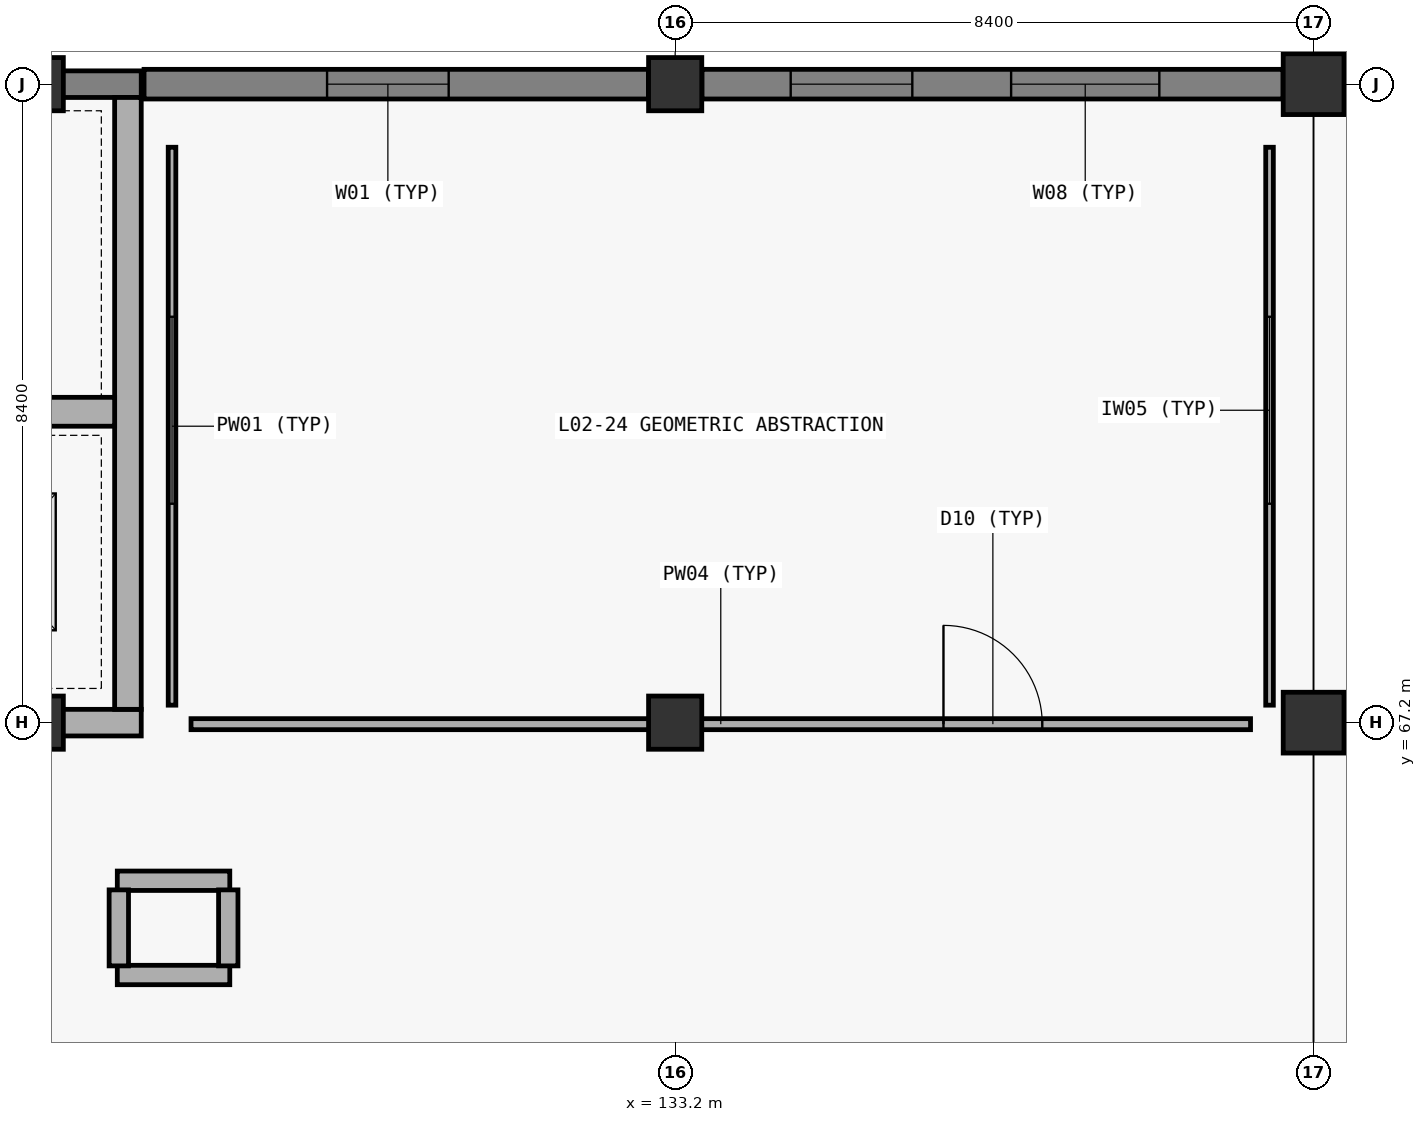
"""IFC4 building model, lengths in metres.
Left out: names, types, materials, properties, quantities, classifications, styles, units other than length and angle.
Written with IfcOpenShell. Run it as: python <this file> out.ifc"""

import sys

from ifc_helpers import new_model, si_unit, direction, frame, frame_2d, origin, origin_2d, place, context, subcontext, project, spatial, rectangle, extrude, element, fill, save


model = new_model("IFC4")
c1 = context("Model", 3, precision=1e-05, world=origin(), true_north=direction((0.0, 1.0)))
c2 = subcontext(c1, "Body", "Model", "MODEL_VIEW")
j1 = project(units=[si_unit("LENGTHUNIT", "METRE"), si_unit("PLANEANGLEUNIT", "RADIAN")], contexts=[c1])
p1 = place(None, origin())
s1 = spatial("IfcSite", under=j1, at=p1, CompositionType="ELEMENT")
p2 = place(p1, origin())
s2 = spatial("IfcBuilding", under=s1, at=p2, CompositionType="ELEMENT")
p3 = place(p2, frame((0.0, 0.0, 10.5)))
s3 = spatial("IfcBuildingStorey", under=s2, at=p3, CompositionType="ELEMENT", Elevation=10.5)
for number, where, z_axis, x_axis in (
    (1, (124.8, 67.2, 0.0), (0.0, 0.0, 1.0), (1.0, 0.0, 0.0)),
    (2, (124.8, 75.6, 0.0), (0.0, 0.0, 1.0), (1.0, 0.0, 0.0)),
    (3, (133.2, 67.2, 0.0), (0.0, 0.0, 1.0), (1.0, 0.0, 0.0)),
    (4, (133.2, 75.6, 0.0), (0.0, 0.0, 1.0), (1.0, 0.0, 0.0)),
):
    element("IfcColumn", number, at=place(p3, frame(where, z_axis=z_axis, x_axis=x_axis)), inside=s3, PredefinedType="COLUMN", context=c2, shape_type="SweptSolid", body=[
        extrude(rectangle(XDim=0.7, YDim=0.7, at=origin_2d()), origin(), (0.0, 0.0, 1.0), 5.1),
    ])
for number, where, z_axis, x_axis in (
    (5, (141.6, 67.2, 0.0), (0.0, 0.0, 1.0), (1.0, 0.0, 0.0)),
    (6, (141.6, 75.6, 0.0), (0.0, 0.0, 1.0), (1.0, 0.0, 0.0)),
):
    element("IfcColumn", number, at=place(p3, frame(where, z_axis=z_axis, x_axis=x_axis)), inside=s3, PredefinedType="COLUMN", context=c2, shape_type="SweptSolid", body=[
        extrude(rectangle(XDim=0.8, YDim=0.8, at=origin_2d()), origin(), (0.0, 0.0, 1.0), 5.1),
    ])
p4 = place(p3, frame((116.825, 67.2, 0.0), z_axis=(0.0, 0.0, 1.0), x_axis=(1.0, 0.0, 0.0)))
e7 = element("IfcWall", 7, at=p4, inside=s3, PredefinedType="SHEAR", context=c2, shape_type="SweptSolid", body=[
    extrude(rectangle(XDim=9.35, YDim=0.35, at=frame_2d((4.675, 0.0))), origin(), (0.0, 0.0, 1.0), 5.1),
])
p5 = place(p4, frame((1.75, 0.0, 0.0)))
e8 = element("IfcOpeningElement", 8, at=p5, cuts=e7, PredefinedType="OPENING", context=c2, shape_type="SweptSolid", body=[
    extrude(rectangle(XDim=1.18, YDim=2.24, at=frame_2d((0.59, 1.12))), frame((0.0, 0.185, 0.0), z_axis=(0.0, -1.0, 0.0), x_axis=(1.0, 0.0, 0.0)), (0.0, 0.0, 1.0), 0.37),
])
p6 = place(p3, frame((116.825, 75.6, 0.0), z_axis=(0.0, 0.0, 1.0), x_axis=(1.0, 0.0, 0.0)))
e9 = element("IfcWall", 9, at=p6, inside=s3, PredefinedType="SHEAR", context=c2, shape_type="SweptSolid", body=[
    extrude(rectangle(XDim=9.35, YDim=0.35, at=frame_2d((4.675, 0.0))), origin(), (0.0, 0.0, 1.0), 5.1),
])
p7 = place(p3, frame((126.0, 67.375, 0.0), z_axis=(0.0, 0.0, 1.0), x_axis=(0.0, 1.0, 0.0)))
e10 = element("IfcWall", 10, at=p7, inside=s3, PredefinedType="SHEAR", context=c2, shape_type="SweptSolid", body=[
    extrude(rectangle(XDim=8.05, YDim=0.35, at=frame_2d((4.025, 0.0))), origin(), (0.0, 0.0, 1.0), 5.1),
])
p8 = place(p3, frame((117.175, 71.29, 0.0), z_axis=(0.0, 0.0, 1.0), x_axis=(1.0, 0.0, 0.0)))
e11 = element("IfcWall", 11, at=p8, inside=s3, PredefinedType="SHEAR", context=c2, shape_type="SweptSolid", body=[
    extrude(rectangle(XDim=8.65, YDim=0.38, at=frame_2d((4.325, 0.0))), origin(), (0.0, 0.0, 1.0), 5.1),
])
p9 = place(p8, frame((0.45, 0.0, 0.0)))
e12 = element("IfcOpeningElement", 12, at=p9, cuts=e11, PredefinedType="OPENING", context=c2, shape_type="SweptSolid", body=[
    extrude(rectangle(XDim=1.08, YDim=2.18, at=frame_2d((0.54, 1.09))), frame((0.0, 0.2, 0.0), z_axis=(0.0, -1.0, 0.0), x_axis=(1.0, 0.0, 0.0)), (0.0, 0.0, 1.0), 0.4),
])
p10 = place(p3, frame((126.212, 75.6, 0.0), z_axis=(0.0, 0.0, 1.0), x_axis=(1.0, 0.0, 0.0)))
e13 = element("IfcWall", 13, at=p10, inside=s3, PredefinedType="SOLIDWALL", context=c2, shape_type="SweptSolid", body=[
    extrude(rectangle(XDim=6.636, YDim=0.39, at=frame_2d((3.318, 0.0))), origin(), (0.0, 0.0, 1.0), 4.35),
])
p11 = place(p10, frame((2.408, 0.0, 0.85)))
e14 = element("IfcOpeningElement", 14, at=p11, cuts=e13, PredefinedType="OPENING", context=c2, shape_type="SweptSolid", body=[
    extrude(rectangle(XDim=1.6, YDim=2.5, at=frame_2d((0.8, 1.25))), frame((0.0, 0.205, 0.0), z_axis=(0.0, -1.0, 0.0), x_axis=(1.0, 0.0, 0.0)), (0.0, 0.0, 1.0), 0.41),
])
p12 = place(p3, frame((133.552, 75.6, 0.0), z_axis=(0.0, 0.0, 1.0), x_axis=(1.0, 0.0, 0.0)))
e15 = element("IfcWall", 15, at=p12, inside=s3, PredefinedType="SOLIDWALL", context=c2, shape_type="SweptSolid", body=[
    extrude(rectangle(XDim=7.646, YDim=0.39, at=frame_2d((3.823, 0.0))), origin(), (0.0, 0.0, 1.0), 3.9),
])
p13 = place(p12, frame((1.168, 0.0, 0.85)))
e16 = element("IfcOpeningElement", 16, at=p13, cuts=e15, PredefinedType="OPENING", context=c2, shape_type="SweptSolid", body=[
    extrude(rectangle(XDim=1.6, YDim=2.5, at=frame_2d((0.8, 1.25))), frame((0.0, 0.205, 0.0), z_axis=(0.0, -1.0, 0.0), x_axis=(1.0, 0.0, 0.0)), (0.0, 0.0, 1.0), 0.41),
])
p14 = place(p12, frame((4.068, 0.0, 0.85)))
e17 = element("IfcOpeningElement", 17, at=p14, cuts=e15, PredefinedType="OPENING", context=c2, shape_type="SweptSolid", body=[
    extrude(rectangle(XDim=1.95, YDim=2.3, at=frame_2d((0.975, 1.15))), frame((0.0, 0.205, 0.0), z_axis=(0.0, -1.0, 0.0), x_axis=(1.0, 0.0, 0.0)), (0.0, 0.0, 1.0), 0.41),
])
p15 = place(p3, frame((142.002, 75.6, 0.0), z_axis=(0.0, 0.0, 1.0), x_axis=(1.0, 0.0, 0.0)))
e18 = element("IfcWall", 18, at=p15, inside=s3, PredefinedType="SOLIDWALL", context=c2, shape_type="SweptSolid", body=[
    extrude(rectangle(XDim=7.596, YDim=0.39, at=frame_2d((3.798, 0.0))), origin(), (0.0, 0.0, 1.0), 3.9),
])
p16 = place(p15, frame((1.018, 0.0, 0.85)))
e19 = element("IfcOpeningElement", 19, at=p16, cuts=e18, PredefinedType="OPENING", context=c2, shape_type="SweptSolid", body=[
    extrude(rectangle(XDim=2.4, YDim=2.15, at=frame_2d((1.2, 1.075))), frame((0.0, 0.205, 0.0), z_axis=(0.0, -1.0, 0.0), x_axis=(1.0, 0.0, 0.0)), (0.0, 0.0, 1.0), 0.41),
])
p17 = place(p15, frame((4.118, 0.0, 0.85)))
e20 = element("IfcOpeningElement", 20, at=p17, cuts=e18, PredefinedType="OPENING", context=c2, shape_type="SweptSolid", body=[
    extrude(rectangle(XDim=1.95, YDim=2.3, at=frame_2d((0.975, 1.15))), frame((0.0, 0.205, 0.0), z_axis=(0.0, -1.0, 0.0), x_axis=(1.0, 0.0, 0.0)), (0.0, 0.0, 1.0), 0.41),
])
for number, where, z_axis, x_axis in (
    (21, (125.86, 65.12, 0.0), (0.0, 0.0, 1.0), (1.0, 0.0, 0.0)),
    (22, (125.86, 63.88, 0.0), (0.0, 0.0, 1.0), (1.0, 0.0, 0.0)),
):
    element("IfcWall", number, at=place(p3, frame(where, z_axis=z_axis, x_axis=x_axis)), inside=s3, PredefinedType="PARTITIONING", context=c2, shape_type="SweptSolid", body=[
        extrude(rectangle(XDim=1.48, YDim=0.255, at=frame_2d((0.74, 0.0))), origin(), (0.0, 0.0, 1.0), 4.43),
    ])
p18 = place(p3, frame((125.88, 64.0, 0.0), z_axis=(0.0, 0.0, 1.0), x_axis=(0.0, 1.0, 0.0)))
e23 = element("IfcWall", 23, at=p18, inside=s3, PredefinedType="PARTITIONING", context=c2, shape_type="SweptSolid", body=[
    extrude(rectangle(XDim=1.0, YDim=0.255, at=frame_2d((0.5, 0.0))), origin(), (0.0, 0.0, 1.0), 4.72),
])
p19 = place(p3, frame((127.32, 64.0, 0.0), z_axis=(0.0, 0.0, 1.0), x_axis=(0.0, 1.0, 0.0)))
e24 = element("IfcWall", 24, at=p19, inside=s3, PredefinedType="PARTITIONING", context=c2, shape_type="SweptSolid", body=[
    extrude(rectangle(XDim=1.0, YDim=0.255, at=frame_2d((0.5, 0.0))), origin(), (0.0, 0.0, 1.0), 4.43),
])
p20 = place(p3, frame((126.83, 67.18, 0.0), z_axis=(0.0, 0.0, 1.0), x_axis=(1.0, 0.0, 0.0)))
e25 = element("IfcWall", 25, at=p20, inside=s3, PredefinedType="PARTITIONING", context=c2, shape_type="SweptSolid", body=[
    extrude(rectangle(XDim=13.94, YDim=0.145, at=frame_2d((6.97, 0.0))), origin(), (0.0, 0.0, 1.0), 3.9),
])
p21 = place(p20, frame((9.9, 0.0, 0.0)))
e26 = element("IfcOpeningElement", 26, at=p21, cuts=e25, PredefinedType="OPENING", context=c2, shape_type="SweptSolid", body=[
    extrude(rectangle(XDim=1.3, YDim=2.32, at=frame_2d((0.65, 1.16))), frame((0.0, 0.083, 0.0), z_axis=(0.0, -1.0, 0.0), x_axis=(1.0, 0.0, 0.0)), (0.0, 0.0, 1.0), 0.165),
])
p22 = place(p3, frame((126.58, 67.43, 0.0), z_axis=(0.0, 0.0, 1.0), x_axis=(0.0, 1.0, 0.0)))
e27 = element("IfcWall", 27, at=p22, inside=s3, PredefinedType="PARTITIONING", context=c2, shape_type="SweptSolid", body=[
    extrude(rectangle(XDim=7.34, YDim=0.1, at=frame_2d((3.67, 0.0))), origin(), (0.0, 0.0, 1.0), 3.9),
])
p23 = place(p22, frame((2.65, 0.0, 0.9)))
e28 = element("IfcOpeningElement", 28, at=p23, cuts=e27, PredefinedType="OPENING", context=c2, shape_type="SweptSolid", body=[
    extrude(rectangle(XDim=2.46, YDim=1.38, at=frame_2d((1.23, 0.69))), frame((0.0, 0.06, 0.0), z_axis=(0.0, -1.0, 0.0), x_axis=(1.0, 0.0, 0.0)), (0.0, 0.0, 1.0), 0.12),
])
p24 = place(p3, frame((141.02, 67.43, 0.0), z_axis=(0.0, 0.0, 1.0), x_axis=(0.0, 1.0, 0.0)))
e29 = element("IfcWall", 29, at=p24, inside=s3, PredefinedType="PARTITIONING", context=c2, shape_type="SweptSolid", body=[
    extrude(rectangle(XDim=7.34, YDim=0.1, at=frame_2d((3.67, 0.0))), origin(), (0.0, 0.0, 1.0), 4.23),
])
p25 = place(p24, frame((2.65, 0.0, 0.9)))
e30 = element("IfcOpeningElement", 30, at=p25, cuts=e29, PredefinedType="OPENING", context=c2, shape_type="SweptSolid", body=[
    extrude(rectangle(XDim=2.46, YDim=1.38, at=frame_2d((1.23, 0.69))), frame((0.0, 0.06, 0.0), z_axis=(0.0, -1.0, 0.0), x_axis=(1.0, 0.0, 0.0)), (0.0, 0.0, 1.0), 0.12),
])
p26 = place(p11, origin())
e31 = element("IfcWindow", 31, at=p26, inside=s3, PartitioningType="SINGLE_PANEL", PredefinedType="WINDOW", context=c2, shape_type="SweptSolid", body=[
    extrude(rectangle(XDim=1.6, YDim=2.5, at=frame_2d((0.8, 1.25))), frame((0.0, 0.03, 0.0), z_axis=(0.0, -1.0, 0.0), x_axis=(1.0, 0.0, 0.0)), (0.0, 0.0, 1.0), 0.06),
])
fill(e14, e31)
p27 = place(p13, origin())
e32 = element("IfcWindow", 32, at=p27, inside=s3, PartitioningType="SINGLE_PANEL", PredefinedType="WINDOW", context=c2, shape_type="SweptSolid", body=[
    extrude(rectangle(XDim=1.6, YDim=2.5, at=frame_2d((0.8, 1.25))), frame((0.0, 0.03, 0.0), z_axis=(0.0, -1.0, 0.0), x_axis=(1.0, 0.0, 0.0)), (0.0, 0.0, 1.0), 0.06),
])
fill(e16, e32)
p28 = place(p14, origin())
e33 = element("IfcWindow", 33, at=p28, inside=s3, PartitioningType="SINGLE_PANEL", PredefinedType="WINDOW", context=c2, shape_type="SweptSolid", body=[
    extrude(rectangle(XDim=1.95, YDim=2.3, at=frame_2d((0.975, 1.15))), frame((0.0, 0.03, 0.0), z_axis=(0.0, -1.0, 0.0), x_axis=(1.0, 0.0, 0.0)), (0.0, 0.0, 1.0), 0.06),
])
fill(e17, e33)
p29 = place(p21, origin())
e34 = element("IfcDoor", 34, at=p29, inside=s3, OperationType="SINGLE_SWING_LEFT", PredefinedType="DOOR", context=c2, shape_type="SweptSolid", body=[
    extrude(rectangle(XDim=1.3, YDim=2.32, at=frame_2d((0.65, 1.16))), frame((0.0, 0.025, 0.0), z_axis=(0.0, -1.0, 0.0), x_axis=(1.0, 0.0, 0.0)), (0.0, 0.0, 1.0), 0.05),
])
fill(e26, e34)
p30 = place(p23, origin())
e35 = element("IfcWindow", 35, at=p30, inside=s3, PartitioningType="SINGLE_PANEL", PredefinedType="WINDOW", context=c2, shape_type="SweptSolid", body=[
    extrude(rectangle(XDim=2.46, YDim=1.38, at=frame_2d((1.23, 0.69))), frame((0.0, 0.03, 0.0), z_axis=(0.0, -1.0, 0.0), x_axis=(1.0, 0.0, 0.0)), (0.0, 0.0, 1.0), 0.06),
])
fill(e28, e35)
p31 = place(p25, origin())
e36 = element("IfcWindow", 36, at=p31, inside=s3, PartitioningType="SINGLE_PANEL", PredefinedType="WINDOW", context=c2, shape_type="SweptSolid", body=[
    extrude(rectangle(XDim=2.46, YDim=1.38, at=frame_2d((1.23, 0.69))), frame((0.0, 0.03, 0.0), z_axis=(0.0, -1.0, 0.0), x_axis=(1.0, 0.0, 0.0)), (0.0, 0.0, 1.0), 0.06),
])
fill(e30, e36)
save(model, sys.argv[1])
